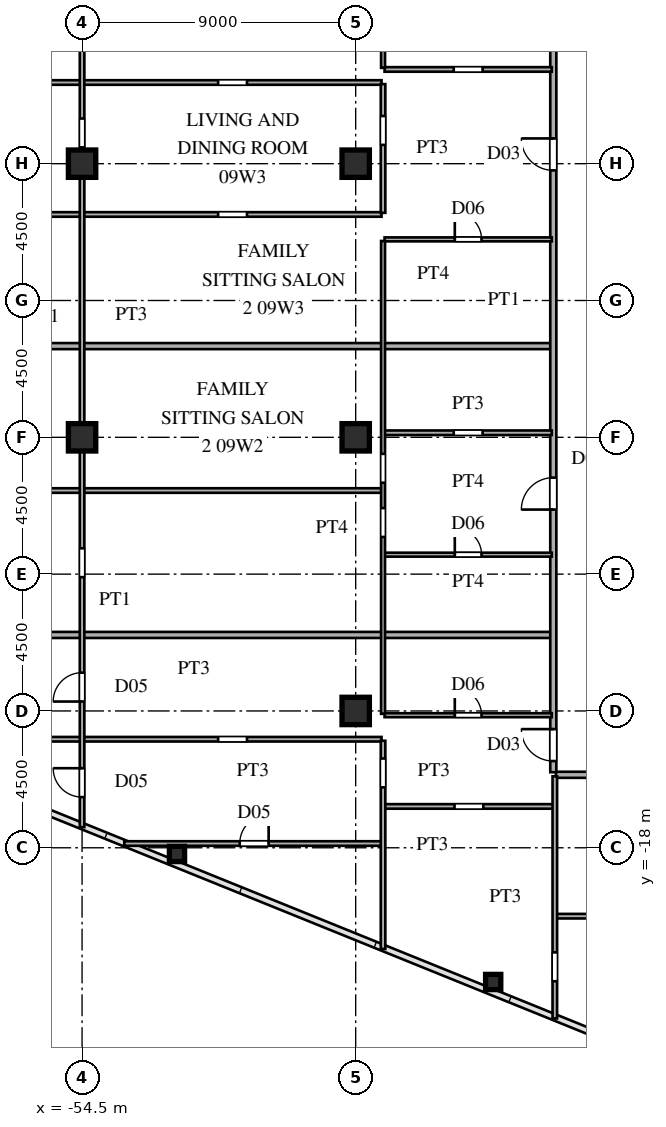
"""IFC4 building model, lengths in metres.
Left out: names, types, materials, properties, quantities, classifications, styles, units other than length and angle.
Written with IfcOpenShell. Run it as: python <this file> out.ifc"""

import sys

from ifc_helpers import new_model, si_unit, direction, frame, frame_2d, origin, origin_2d, place, context, subcontext, project, spatial, rectangle, hollow_rectangle, i_section, extrude, source, transform, mapped, element, fill, save


model = new_model("IFC4")
c1 = context("Model", 3, precision=1e-05, world=origin(), true_north=direction((0.0, 1.0)))
c2 = subcontext(c1, "Body", "Model", "MODEL_VIEW")
j1 = project(units=[si_unit("LENGTHUNIT", "METRE"), si_unit("PLANEANGLEUNIT", "RADIAN")], contexts=[c1])
p1 = place(None, origin())
s1 = spatial("IfcSite", under=j1, at=p1, CompositionType="ELEMENT")
p2 = place(p1, origin())
s2 = spatial("IfcBuilding", under=s1, at=p2, CompositionType="ELEMENT")
p3 = place(p2, frame((0.0, 0.0, 36.9)))
s3 = spatial("IfcBuildingStorey", under=s2, at=p3, CompositionType="ELEMENT", Elevation=36.9)
m1 = source(origin(), c2, "Body", "SweptSolid", [
    extrude(i_section(OverallWidth=0.9, OverallDepth=0.9, WebThickness=0.036, FlangeThickness=0.055, at=origin_2d()), origin(), (0.0, 0.0, 1.0), 3.6),
])
for number, where, z_axis, x_axis in (
    (1, (-45.5, -13.5, 0.0), (0.0, 0.0, 1.0), (1.0, 0.0, 0.0)),
    (2, (-45.5, -4.5, 0.0), (0.0, 0.0, 1.0), (1.0, 0.0, 0.0)),
    (3, (-45.5, 4.5, 0.0), (0.0, 0.0, 1.0), (1.0, 0.0, 0.0)),
    (4, (-54.5, -4.5, 0.0), (0.0, 0.0, 1.0), (1.0, 0.0, 0.0)),
    (5, (-54.5, 4.5, 0.0), (0.0, 0.0, 1.0), (1.0, 0.0, 0.0)),
):
    element("IfcColumn", number, at=place(p3, frame(where, z_axis=z_axis, x_axis=x_axis)), inside=s3, PredefinedType="COLUMN", context=c2, shape_type="MappedRepresentation", body=[
        mapped(m1, transform((0.0, 0.0, 0.0), scale=1.0)),
    ])
m2 = source(origin(), c2, "Body", "SweptSolid", [
    extrude(hollow_rectangle(XDim=0.5, YDim=0.5, WallThickness=0.02, at=origin_2d()), origin(), (0.0, 0.0, 1.0), 3.6),
])
for number, where, z_axis, x_axis in (
    (6, (-40.977, -22.414, 0.0), (0.0, 0.0, 1.0), (1.0, 0.0, 0.0)),
    (7, (-51.378, -18.204, 0.0), (0.0, 0.0, 1.0), (1.0, 0.0, 0.0)),
):
    element("IfcColumn", number, at=place(p3, frame(where, z_axis=z_axis, x_axis=x_axis)), inside=s3, PredefinedType="COLUMN", context=c2, shape_type="MappedRepresentation", body=[
        mapped(m2, transform((0.0, 0.0, 0.0), scale=1.0)),
    ])
p4 = place(p3, frame((-38.9, -20.25, 0.0), z_axis=(0.0, 0.0, 1.0), x_axis=(1.0, 0.0, 0.0)))
e8 = element("IfcWall", 8, at=p4, inside=s3, PredefinedType="PARTITIONING", context=c2, shape_type="SweptSolid", body=[
    extrude(rectangle(XDim=11.435, YDim=0.15, at=frame_2d((5.717, 0.0))), origin(), (0.0, 0.0, 1.0), 3.38),
])
p5 = place(p4, frame((5.2, 0.0, 0.0)))
e9 = element("IfcOpeningElement", 9, at=p5, cuts=e8, PredefinedType="OPENING", context=c2, shape_type="SweptSolid", body=[
    extrude(rectangle(XDim=0.95, YDim=2.15, at=frame_2d((0.475, 1.075))), frame((0.0, 0.085, 0.0), z_axis=(0.0, -1.0, 0.0), x_axis=(1.0, 0.0, 0.0)), (0.0, 0.0, 1.0), 0.17),
])
p6 = place(p3, frame((-53.111, -17.86, 0.0), z_axis=(0.0, 0.0, 1.0), x_axis=(1.0, 0.0, 0.0)))
e10 = element("IfcWall", 10, at=p6, inside=s3, PredefinedType="PARTITIONING", context=c2, shape_type="SweptSolid", body=[
    extrude(rectangle(XDim=8.461, YDim=0.15, at=frame_2d((4.23, 0.0))), origin(), (0.0, 0.0, 1.0), 3.38),
])
p7 = place(p6, frame((3.798, 0.0, 0.0)))
e11 = element("IfcOpeningElement", 11, at=p7, cuts=e10, PredefinedType="OPENING", context=c2, shape_type="SweptSolid", body=[
    extrude(rectangle(XDim=0.95, YDim=2.15, at=frame_2d((0.475, 1.075))), frame((0.0, 0.085, 0.0), z_axis=(0.0, -1.0, 0.0), x_axis=(1.0, 0.0, 0.0)), (0.0, 0.0, 1.0), 0.17),
])
p8 = place(p3, frame((-44.55, -16.64, 0.0), z_axis=(0.0, 0.0, 1.0), x_axis=(1.0, 0.0, 0.0)))
e12 = element("IfcWall", 12, at=p8, inside=s3, PredefinedType="PARTITIONING", context=c2, shape_type="SweptSolid", body=[
    extrude(rectangle(XDim=5.55, YDim=0.15, at=frame_2d((2.775, 0.0))), origin(), (0.0, 0.0, 1.0), 3.38),
])
p9 = place(p8, frame((2.3, 0.0, 0.0)))
e13 = element("IfcOpeningElement", 13, at=p9, cuts=e12, PredefinedType="OPENING", context=c2, shape_type="SweptSolid", body=[
    extrude(rectangle(XDim=0.95, YDim=2.15, at=frame_2d((0.475, 1.075))), frame((0.0, 0.085, 0.0), z_axis=(0.0, -1.0, 0.0), x_axis=(1.0, 0.0, 0.0)), (0.0, 0.0, 1.0), 0.17),
])
p10 = place(p3, frame((-38.915, -15.6, 0.0), z_axis=(0.0, 0.0, 1.0), x_axis=(1.0, 0.0, 0.0)))
e14 = element("IfcWall", 14, at=p10, inside=s3, PredefinedType="PARTITIONING", context=c2, shape_type="SweptSolid", body=[
    extrude(rectangle(XDim=2.33, YDim=0.2, at=frame_2d((1.165, 0.0))), origin(), (0.0, 0.0, 1.0), 3.38),
])
p11 = place(p3, frame((-61.588, -14.43, 0.0), z_axis=(0.0, 0.0, 1.0), x_axis=(1.0, 0.0, 0.0)))
e15 = element("IfcWall", 15, at=p11, inside=s3, PredefinedType="PARTITIONING", context=c2, shape_type="SweptSolid", body=[
    extrude(rectangle(XDim=16.938, YDim=0.15, at=frame_2d((8.469, 0.0))), origin(), (0.0, 0.0, 1.0), 3.38),
])
p12 = place(p11, frame((11.563, 0.0, 0.0)))
e16 = element("IfcOpeningElement", 16, at=p12, cuts=e15, PredefinedType="OPENING", context=c2, shape_type="SweptSolid", body=[
    extrude(rectangle(XDim=0.95, YDim=2.15, at=frame_2d((0.475, 1.075))), frame((0.0, 0.085, 0.0), z_axis=(0.0, -1.0, 0.0), x_axis=(1.0, 0.0, 0.0)), (0.0, 0.0, 1.0), 0.17),
])
p13 = place(p3, frame((-44.55, -13.64, 0.0), z_axis=(0.0, 0.0, 1.0), x_axis=(1.0, 0.0, 0.0)))
e17 = element("IfcWall", 17, at=p13, inside=s3, PredefinedType="PARTITIONING", context=c2, shape_type="SweptSolid", body=[
    extrude(rectangle(XDim=5.5, YDim=0.13, at=frame_2d((2.75, 0.0))), origin(), (0.0, 0.0, 1.0), 2.68),
])
p14 = place(p13, frame((2.31, 0.0, 0.0)))
e18 = element("IfcOpeningElement", 18, at=p14, cuts=e17, PredefinedType="OPENING", context=c2, shape_type="SweptSolid", body=[
    extrude(rectangle(XDim=0.88, YDim=2.1, at=frame_2d((0.44, 1.05))), frame((0.0, 0.075, 0.0), z_axis=(0.0, -1.0, 0.0), x_axis=(1.0, 0.0, 0.0)), (0.0, 0.0, 1.0), 0.15),
])
p15 = place(p3, frame((-70.043, -11.0, 0.0), z_axis=(0.0, 0.0, 1.0), x_axis=(1.0, 0.0, 0.0)))
e19 = element("IfcWall", 19, at=p15, inside=s3, PredefinedType="PARTITIONING", context=c2, shape_type="SweptSolid", body=[
    extrude(rectangle(XDim=30.963, YDim=0.2, at=frame_2d((15.481, 0.0))), origin(), (0.0, 0.0, 1.0), 3.38),
])
p16 = place(p3, frame((-44.55, -8.36, 0.0), z_axis=(0.0, 0.0, 1.0), x_axis=(1.0, 0.0, 0.0)))
e20 = element("IfcWall", 20, at=p16, inside=s3, PredefinedType="PARTITIONING", context=c2, shape_type="SweptSolid", body=[
    extrude(rectangle(XDim=5.5, YDim=0.13, at=frame_2d((2.75, 0.0))), origin(), (0.0, 0.0, 1.0), 3.38),
])
p17 = place(p16, frame((2.31, 0.0, 0.0)))
e21 = element("IfcOpeningElement", 21, at=p17, cuts=e20, PredefinedType="OPENING", context=c2, shape_type="SweptSolid", body=[
    extrude(rectangle(XDim=0.88, YDim=2.1, at=frame_2d((0.44, 1.05))), frame((0.0, 0.075, 0.0), z_axis=(0.0, -1.0, 0.0), x_axis=(1.0, 0.0, 0.0)), (0.0, 0.0, 1.0), 0.15),
])
p18 = place(p3, frame((-72.535, -6.25, 0.0), z_axis=(0.0, 0.0, 1.0), x_axis=(1.0, 0.0, 0.0)))
e22 = element("IfcWall", 22, at=p18, inside=s3, PredefinedType="PARTITIONING", context=c2, shape_type="SweptSolid", body=[
    extrude(rectangle(XDim=27.885, YDim=0.15, at=frame_2d((13.942, 0.0))), origin(), (0.0, 0.0, 1.0), 3.38),
])
p19 = place(p18, frame((14.71, 0.0, 0.0)))
e23 = element("IfcOpeningElement", 23, at=p19, cuts=e22, PredefinedType="OPENING", context=c2, shape_type="SweptSolid", body=[
    extrude(rectangle(XDim=0.95, YDim=2.15, at=frame_2d((0.475, 1.075))), frame((0.0, 0.085, 0.0), z_axis=(0.0, -1.0, 0.0), x_axis=(1.0, 0.0, 0.0)), (0.0, 0.0, 1.0), 0.17),
])
p20 = place(p3, frame((-44.55, -4.35, 0.0), z_axis=(0.0, 0.0, 1.0), x_axis=(1.0, 0.0, 0.0)))
e24 = element("IfcWall", 24, at=p20, inside=s3, PredefinedType="PARTITIONING", context=c2, shape_type="SweptSolid", body=[
    extrude(rectangle(XDim=5.5, YDim=0.15, at=frame_2d((2.75, 0.0))), origin(), (0.0, 0.0, 1.0), 2.68),
])
p21 = place(p20, frame((2.275, 0.0, 0.0)))
e25 = element("IfcOpeningElement", 25, at=p21, cuts=e24, PredefinedType="OPENING", context=c2, shape_type="SweptSolid", body=[
    extrude(rectangle(XDim=0.95, YDim=2.15, at=frame_2d((0.475, 1.075))), frame((0.0, 0.085, 0.0), z_axis=(0.0, -1.0, 0.0), x_axis=(1.0, 0.0, 0.0)), (0.0, 0.0, 1.0), 0.17),
])
p22 = place(p3, frame((-72.505, -1.5, 0.0), z_axis=(0.0, 0.0, 1.0), x_axis=(1.0, 0.0, 0.0)))
e26 = element("IfcWall", 26, at=p22, inside=s3, PredefinedType="PARTITIONING", context=c2, shape_type="SweptSolid", body=[
    extrude(rectangle(XDim=33.425, YDim=0.2, at=frame_2d((16.712, 0.0))), origin(), (0.0, 0.0, 1.0), 3.38),
])
p23 = place(p3, frame((-44.55, 2.01, 0.0), z_axis=(0.0, 0.0, 1.0), x_axis=(1.0, 0.0, 0.0)))
e27 = element("IfcWall", 27, at=p23, inside=s3, PredefinedType="PARTITIONING", context=c2, shape_type="SweptSolid", body=[
    extrude(rectangle(XDim=5.5, YDim=0.13, at=frame_2d((2.75, 0.0))), origin(), (0.0, 0.0, 1.0), 3.38),
])
p24 = place(p23, frame((2.31, 0.0, 0.0)))
e28 = element("IfcOpeningElement", 28, at=p24, cuts=e27, PredefinedType="OPENING", context=c2, shape_type="SweptSolid", body=[
    extrude(rectangle(XDim=0.88, YDim=2.1, at=frame_2d((0.44, 1.05))), frame((0.0, 0.075, 0.0), z_axis=(0.0, -1.0, 0.0), x_axis=(1.0, 0.0, 0.0)), (0.0, 0.0, 1.0), 0.15),
])
p25 = place(p3, frame((-72.535, 2.83, 0.0), z_axis=(0.0, 0.0, 1.0), x_axis=(1.0, 0.0, 0.0)))
e29 = element("IfcWall", 29, at=p25, inside=s3, PredefinedType="PARTITIONING", context=c2, shape_type="SweptSolid", body=[
    extrude(rectangle(XDim=27.885, YDim=0.15, at=frame_2d((13.942, 0.0))), origin(), (0.0, 0.0, 1.0), 3.38),
])
p26 = place(p25, frame((22.51, 0.0, 0.0)))
e30 = element("IfcOpeningElement", 30, at=p26, cuts=e29, PredefinedType="OPENING", context=c2, shape_type="SweptSolid", body=[
    extrude(rectangle(XDim=0.95, YDim=2.15, at=frame_2d((0.475, 1.075))), frame((0.0, 0.085, 0.0), z_axis=(0.0, -1.0, 0.0), x_axis=(1.0, 0.0, 0.0)), (0.0, 0.0, 1.0), 0.17),
])
p27 = place(p25, frame((14.71, 0.0, 0.0)))
e31 = element("IfcOpeningElement", 31, at=p27, cuts=e29, PredefinedType="OPENING", context=c2, shape_type="SweptSolid", body=[
    extrude(rectangle(XDim=0.95, YDim=2.15, at=frame_2d((0.475, 1.075))), frame((0.0, 0.085, 0.0), z_axis=(0.0, -1.0, 0.0), x_axis=(1.0, 0.0, 0.0)), (0.0, 0.0, 1.0), 0.17),
])
p28 = place(p3, frame((-72.535, 7.17, 0.0), z_axis=(0.0, 0.0, 1.0), x_axis=(1.0, 0.0, 0.0)))
e32 = element("IfcWall", 32, at=p28, inside=s3, PredefinedType="PARTITIONING", context=c2, shape_type="SweptSolid", body=[
    extrude(rectangle(XDim=27.885, YDim=0.15, at=frame_2d((13.942, 0.0))), origin(), (0.0, 0.0, 1.0), 3.38),
])
p29 = place(p28, frame((22.51, 0.0, 0.0)))
e33 = element("IfcOpeningElement", 33, at=p29, cuts=e32, PredefinedType="OPENING", context=c2, shape_type="SweptSolid", body=[
    extrude(rectangle(XDim=0.95, YDim=2.15, at=frame_2d((0.475, 1.075))), frame((0.0, 0.085, 0.0), z_axis=(0.0, -1.0, 0.0), x_axis=(1.0, 0.0, 0.0)), (0.0, 0.0, 1.0), 0.17),
])
p30 = place(p28, frame((14.71, 0.0, 0.0)))
e34 = element("IfcOpeningElement", 34, at=p30, cuts=e32, PredefinedType="OPENING", context=c2, shape_type="SweptSolid", body=[
    extrude(rectangle(XDim=0.95, YDim=2.15, at=frame_2d((0.475, 1.075))), frame((0.0, 0.085, 0.0), z_axis=(0.0, -1.0, 0.0), x_axis=(1.0, 0.0, 0.0)), (0.0, 0.0, 1.0), 0.17),
])
p31 = place(p3, frame((-44.55, 7.6, 0.0), z_axis=(0.0, 0.0, 1.0), x_axis=(1.0, 0.0, 0.0)))
e35 = element("IfcWall", 35, at=p31, inside=s3, PredefinedType="PARTITIONING", context=c2, shape_type="SweptSolid", body=[
    extrude(rectangle(XDim=5.5, YDim=0.15, at=frame_2d((2.75, 0.0))), origin(), (0.0, 0.0, 1.0), 3.38),
])
p32 = place(p31, frame((2.275, 0.0, 0.0)))
e36 = element("IfcOpeningElement", 36, at=p32, cuts=e35, PredefinedType="OPENING", context=c2, shape_type="SweptSolid", body=[
    extrude(rectangle(XDim=0.95, YDim=2.15, at=frame_2d((0.475, 1.075))), frame((0.0, 0.085, 0.0), z_axis=(0.0, -1.0, 0.0), x_axis=(1.0, 0.0, 0.0)), (0.0, 0.0, 1.0), 0.17),
])
p33 = place(p3, frame((-54.5, -17.321, 0.0), z_axis=(0.0, 0.0, 1.0), x_axis=(0.0, 1.0, 0.0)))
e37 = element("IfcWall", 37, at=p33, inside=s3, PredefinedType="PARTITIONING", context=c2, shape_type="SweptSolid", body=[
    extrude(rectangle(XDim=33.667, YDim=0.15, at=frame_2d((16.833, 0.0))), origin(), (0.0, 0.0, 1.0), 2.68),
])
p34 = place(p33, frame((0.988, 0.0, 0.0)))
e38 = element("IfcOpeningElement", 38, at=p34, cuts=e37, PredefinedType="OPENING", context=c2, shape_type="SweptSolid", body=[
    extrude(rectangle(XDim=0.95, YDim=2.15, at=frame_2d((0.475, 1.075))), frame((0.0, 0.085, 0.0), z_axis=(0.0, -1.0, 0.0), x_axis=(1.0, 0.0, 0.0)), (0.0, 0.0, 1.0), 0.17),
])
p35 = place(p33, frame((4.131, 0.0, 0.0)))
e39 = element("IfcOpeningElement", 39, at=p35, cuts=e37, PredefinedType="OPENING", context=c2, shape_type="SweptSolid", body=[
    extrude(rectangle(XDim=0.95, YDim=2.15, at=frame_2d((0.475, 1.075))), frame((0.0, 0.085, 0.0), z_axis=(0.0, -1.0, 0.0), x_axis=(1.0, 0.0, 0.0)), (0.0, 0.0, 1.0), 0.17),
])
p36 = place(p33, frame((8.221, 0.0, 0.0)))
e40 = element("IfcOpeningElement", 40, at=p36, cuts=e37, PredefinedType="OPENING", context=c2, shape_type="SweptSolid", body=[
    extrude(rectangle(XDim=0.95, YDim=2.15, at=frame_2d((0.475, 1.075))), frame((0.0, 0.085, 0.0), z_axis=(0.0, -1.0, 0.0), x_axis=(1.0, 0.0, 0.0)), (0.0, 0.0, 1.0), 0.17),
])
p37 = place(p33, frame((22.357, 0.0, 0.0)))
e41 = element("IfcOpeningElement", 41, at=p37, cuts=e37, PredefinedType="OPENING", context=c2, shape_type="SweptSolid", body=[
    extrude(rectangle(XDim=0.95, YDim=2.15, at=frame_2d((0.475, 1.075))), frame((0.0, 0.085, 0.0), z_axis=(0.0, -1.0, 0.0), x_axis=(1.0, 0.0, 0.0)), (0.0, 0.0, 1.0), 0.17),
])
p38 = place(p33, frame((30.794, 0.0, 0.0)))
e42 = element("IfcOpeningElement", 42, at=p38, cuts=e37, PredefinedType="OPENING", context=c2, shape_type="SweptSolid", body=[
    extrude(rectangle(XDim=0.95, YDim=2.15, at=frame_2d((0.475, 1.075))), frame((0.0, 0.085, 0.0), z_axis=(0.0, -1.0, 0.0), x_axis=(1.0, 0.0, 0.0)), (0.0, 0.0, 1.0), 0.17),
])
p39 = place(p3, frame((-44.6, -21.328, 0.0), z_axis=(0.0, 0.0, 1.0), x_axis=(0.0, 1.0, 0.0)))
e43 = element("IfcWall", 43, at=p39, inside=s3, PredefinedType="PARTITIONING", context=c2, shape_type="SweptSolid", body=[
    extrude(rectangle(XDim=6.847, YDim=0.15, at=frame_2d((3.423, 0.0))), origin(), (0.0, 0.0, 1.0), 3.38),
])
p40 = place(p39, frame((5.315, 0.0, 0.0)))
e44 = element("IfcOpeningElement", 44, at=p40, cuts=e43, PredefinedType="OPENING", context=c2, shape_type="SweptSolid", body=[
    extrude(rectangle(XDim=0.95, YDim=2.15, at=frame_2d((0.475, 1.075))), frame((0.0, 0.085, 0.0), z_axis=(0.0, -1.0, 0.0), x_axis=(1.0, 0.0, 0.0)), (0.0, 0.0, 1.0), 0.17),
])
p41 = place(p3, frame((-44.6, -13.595, 0.0), z_axis=(0.0, 0.0, 1.0), x_axis=(0.0, 1.0, 0.0)))
e45 = element("IfcWall", 45, at=p41, inside=s3, PredefinedType="PARTITIONING", context=c2, shape_type="SweptSolid", body=[
    extrude(rectangle(XDim=15.553, YDim=0.13, at=frame_2d((7.776, 0.0))), origin(), (0.0, 0.0, 1.0), 3.38),
])
p42 = place(p41, frame((5.817, 0.0, 0.0)))
e46 = element("IfcOpeningElement", 46, at=p42, cuts=e45, PredefinedType="OPENING", context=c2, shape_type="SweptSolid", body=[
    extrude(rectangle(XDim=0.95, YDim=2.15, at=frame_2d((0.475, 1.075))), frame((0.0, 0.075, 0.0), z_axis=(0.0, -1.0, 0.0), x_axis=(1.0, 0.0, 0.0)), (0.0, 0.0, 1.0), 0.15),
])
p43 = place(p41, frame((7.602, 0.0, 0.0)))
e47 = element("IfcOpeningElement", 47, at=p43, cuts=e45, PredefinedType="OPENING", context=c2, shape_type="SweptSolid", body=[
    extrude(rectangle(XDim=0.95, YDim=2.15, at=frame_2d((0.475, 1.075))), frame((0.0, 0.075, 0.0), z_axis=(0.0, -1.0, 0.0), x_axis=(1.0, 0.0, 0.0)), (0.0, 0.0, 1.0), 0.15),
])
p44 = place(p3, frame((-44.6, 2.883, 0.0), z_axis=(0.0, 0.0, 1.0), x_axis=(0.0, 1.0, 0.0)))
e48 = element("IfcWall", 48, at=p44, inside=s3, PredefinedType="PARTITIONING", context=c2, shape_type="SweptSolid", body=[
    extrude(rectangle(XDim=4.234, YDim=0.15, at=frame_2d((2.117, 0.0))), origin(), (0.0, 0.0, 1.0), 3.38),
])
p45 = place(p44, frame((2.235, 0.0, 0.0)))
e49 = element("IfcOpeningElement", 49, at=p45, cuts=e48, PredefinedType="OPENING", context=c2, shape_type="SweptSolid", body=[
    extrude(rectangle(XDim=0.95, YDim=2.15, at=frame_2d((0.475, 1.075))), frame((0.0, 0.085, 0.0), z_axis=(0.0, -1.0, 0.0), x_axis=(1.0, 0.0, 0.0)), (0.0, 0.0, 1.0), 0.17),
])
p46 = place(p3, frame((-44.6, 7.652, 0.0), z_axis=(0.0, 0.0, 1.0), x_axis=(0.0, 1.0, 0.0)))
e50 = element("IfcWall", 50, at=p46, inside=s3, PredefinedType="PARTITIONING", context=c2, shape_type="SweptSolid", body=[
    extrude(rectangle(XDim=8.694, YDim=0.13, at=frame_2d((4.347, 0.0))), origin(), (0.0, 0.0, 1.0), 3.38),
])
p47 = place(p46, frame((7.144, 0.0, 0.0)))
e51 = element("IfcOpeningElement", 51, at=p47, cuts=e50, PredefinedType="OPENING", context=c2, shape_type="SweptSolid", body=[
    extrude(rectangle(XDim=0.95, YDim=2.15, at=frame_2d((0.475, 1.075))), frame((0.0, 0.075, 0.0), z_axis=(0.0, -1.0, 0.0), x_axis=(1.0, 0.0, 0.0)), (0.0, 0.0, 1.0), 0.15),
])
p48 = place(p3, frame((-39.0, -15.515, 0.0), z_axis=(0.0, 0.0, 1.0), x_axis=(0.0, 1.0, 0.0)))
e52 = element("IfcWall", 52, at=p48, inside=s3, PredefinedType="PARTITIONING", context=c2, shape_type="SweptSolid", body=[
    extrude(rectangle(XDim=31.03, YDim=0.2, at=frame_2d((15.515, 0.0))), origin(), (0.0, 0.0, 1.0), 3.38),
])
p49 = place(p48, frame((0.367, 0.0, 0.0)))
e53 = element("IfcOpeningElement", 53, at=p49, cuts=e52, PredefinedType="OPENING", context=c2, shape_type="SweptSolid", body=[
    extrude(rectangle(XDim=1.05, YDim=2.25, at=frame_2d((0.525, 1.125))), frame((0.0, 0.11, 0.0), z_axis=(0.0, -1.0, 0.0), x_axis=(1.0, 0.0, 0.0)), (0.0, 0.0, 1.0), 0.22),
])
p50 = place(p48, frame((8.638, 0.0, 0.0)))
e54 = element("IfcOpeningElement", 54, at=p50, cuts=e52, PredefinedType="OPENING", context=c2, shape_type="SweptSolid", body=[
    extrude(rectangle(XDim=1.05, YDim=2.25, at=frame_2d((0.525, 1.125))), frame((0.0, 0.11, 0.0), z_axis=(0.0, -1.0, 0.0), x_axis=(1.0, 0.0, 0.0)), (0.0, 0.0, 1.0), 0.22),
])
p51 = place(p48, frame((19.795, 0.0, 0.0)))
e55 = element("IfcOpeningElement", 55, at=p51, cuts=e52, PredefinedType="OPENING", context=c2, shape_type="SweptSolid", body=[
    extrude(rectangle(XDim=1.05, YDim=2.25, at=frame_2d((0.525, 1.125))), frame((0.0, 0.11, 0.0), z_axis=(0.0, -1.0, 0.0), x_axis=(1.0, 0.0, 0.0)), (0.0, 0.0, 1.0), 0.22),
])
p52 = place(p48, frame((29.82, 0.0, 0.0)))
e56 = element("IfcOpeningElement", 56, at=p52, cuts=e52, PredefinedType="OPENING", context=c2, shape_type="SweptSolid", body=[
    extrude(rectangle(XDim=1.05, YDim=2.25, at=frame_2d((0.525, 1.125))), frame((0.0, 0.11, 0.0), z_axis=(0.0, -1.0, 0.0), x_axis=(1.0, 0.0, 0.0)), (0.0, 0.0, 1.0), 0.22),
])
p53 = place(p3, frame((-38.95, -23.615, 0.0), z_axis=(0.0, 0.0, 1.0), x_axis=(0.0, 1.0, 0.0)))
e57 = element("IfcWall", 57, at=p53, inside=s3, PredefinedType="PARTITIONING", context=c2, shape_type="SweptSolid", body=[
    extrude(rectangle(XDim=7.965, YDim=0.15, at=frame_2d((3.982, 0.0))), origin(), (0.0, 0.0, 1.0), 3.38),
])
p54 = place(p53, frame((1.225, 0.0, 0.0)))
e58 = element("IfcOpeningElement", 58, at=p54, cuts=e57, PredefinedType="OPENING", context=c2, shape_type="SweptSolid", body=[
    extrude(rectangle(XDim=0.95, YDim=2.15, at=frame_2d((0.475, 1.075))), frame((0.0, 0.085, 0.0), z_axis=(0.0, -1.0, 0.0), x_axis=(1.0, 0.0, 0.0)), (0.0, 0.0, 1.0), 0.17),
])
m3 = source(origin(), c2, "Body", "SweptSolid", [
    extrude(rectangle(XDim=0.95, YDim=2.15, at=frame_2d((0.475, 1.075))), frame((0.0, 0.025, 0.0), z_axis=(0.0, -1.0, 0.0), x_axis=(1.0, 0.0, 0.0)), (0.0, 0.0, 1.0), 0.05),
])
p55 = place(p7, origin())
e59 = element("IfcDoor", 59, at=p55, inside=s3, OperationType="SINGLE_SWING_RIGHT", PredefinedType="DOOR", context=c2, shape_type="MappedRepresentation", body=[
    mapped(m3, transform((0.0, 0.0, 0.0), scale=1.0)),
])
fill(e11, e59)
m4 = source(origin(), c2, "Body", "SweptSolid", [
    extrude(rectangle(XDim=0.88, YDim=2.1, at=frame_2d((0.44, 1.05))), frame((0.0, 0.025, 0.0), z_axis=(0.0, -1.0, 0.0), x_axis=(1.0, 0.0, 0.0)), (0.0, 0.0, 1.0), 0.05),
])
p56 = place(p14, origin())
e60 = element("IfcDoor", 60, at=p56, inside=s3, OperationType="SINGLE_SWING_LEFT", PredefinedType="DOOR", context=c2, shape_type="MappedRepresentation", body=[
    mapped(m4, transform((0.0, 0.0, 0.0), scale=1.0)),
])
fill(e18, e60)
p57 = place(p17, origin())
e61 = element("IfcDoor", 61, at=p57, inside=s3, OperationType="SINGLE_SWING_LEFT", PredefinedType="DOOR", context=c2, shape_type="MappedRepresentation", body=[
    mapped(m4, transform((0.0, 0.0, 0.0), scale=1.0)),
])
fill(e21, e61)
p58 = place(p24, origin())
e62 = element("IfcDoor", 62, at=p58, inside=s3, OperationType="SINGLE_SWING_LEFT", PredefinedType="DOOR", context=c2, shape_type="MappedRepresentation", body=[
    mapped(m4, transform((0.0, 0.0, 0.0), scale=1.0)),
])
fill(e28, e62)
p59 = place(p34, origin())
e63 = element("IfcDoor", 63, at=p59, inside=s3, OperationType="SINGLE_SWING_RIGHT", PredefinedType="DOOR", context=c2, shape_type="MappedRepresentation", body=[
    mapped(m3, transform((0.0, 0.0, 0.0), scale=1.0)),
])
fill(e38, e63)
p60 = place(p35, origin())
e64 = element("IfcDoor", 64, at=p60, inside=s3, OperationType="SINGLE_SWING_LEFT", PredefinedType="DOOR", context=c2, shape_type="MappedRepresentation", body=[
    mapped(m3, transform((0.0, 0.0, 0.0), scale=1.0)),
])
fill(e39, e64)
m5 = source(origin(), c2, "Body", "SweptSolid", [
    extrude(rectangle(XDim=1.05, YDim=2.25, at=frame_2d((0.525, 1.125))), frame((0.0, 0.025, 0.0), z_axis=(0.0, -1.0, 0.0), x_axis=(1.0, 0.0, 0.0)), (0.0, 0.0, 1.0), 0.05),
])
p61 = place(p49, origin())
e65 = element("IfcDoor", 65, at=p61, inside=s3, OperationType="SINGLE_SWING_RIGHT", PredefinedType="DOOR", context=c2, shape_type="MappedRepresentation", body=[
    mapped(m5, transform((0.0, 0.0, 0.0), scale=1.0)),
])
fill(e53, e65)
p62 = place(p50, origin())
e66 = element("IfcDoor", 66, at=p62, inside=s3, OperationType="SINGLE_SWING_LEFT", PredefinedType="DOOR", context=c2, shape_type="MappedRepresentation", body=[
    mapped(m5, transform((0.0, 0.0, 0.0), scale=1.0)),
])
fill(e54, e66)
p63 = place(p51, origin())
e67 = element("IfcDoor", 67, at=p63, inside=s3, OperationType="SINGLE_SWING_RIGHT", PredefinedType="DOOR", context=c2, shape_type="MappedRepresentation", body=[
    mapped(m5, transform((0.0, 0.0, 0.0), scale=1.0)),
])
fill(e55, e67)
save(model, sys.argv[1])
